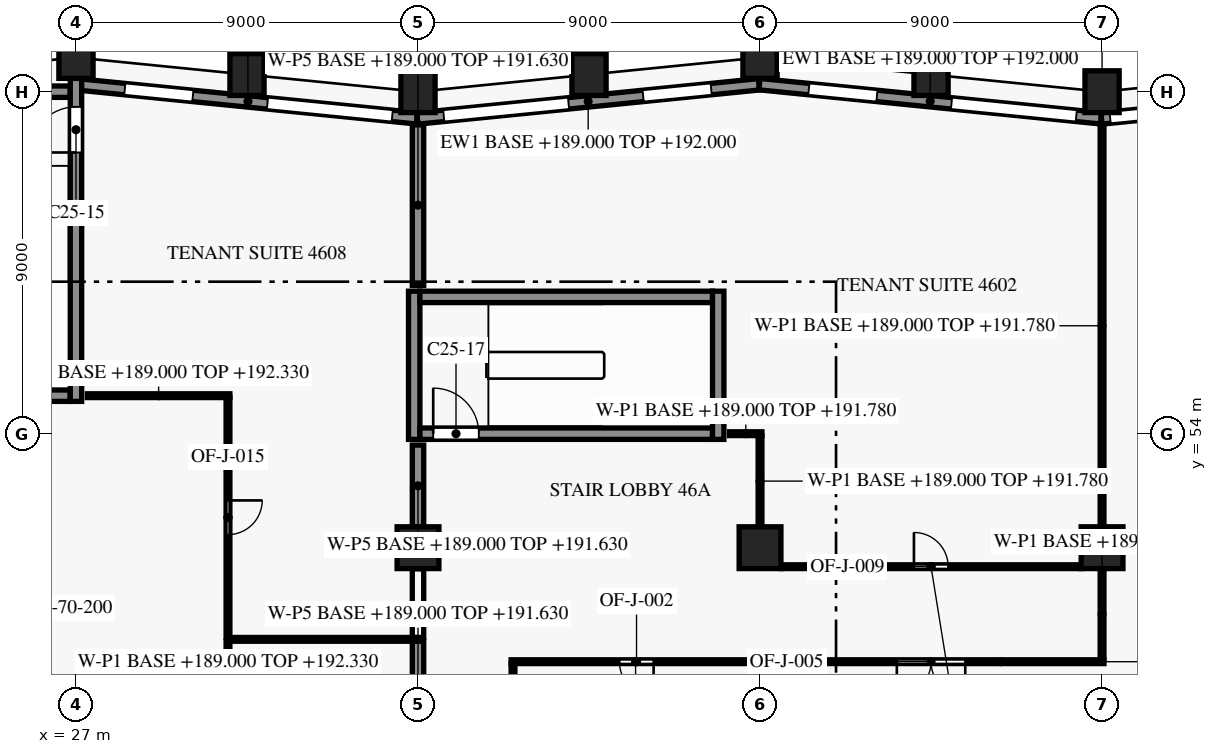
"""IFC4 building model, lengths in metres.
Left out: names, types, materials, properties, quantities, classifications, styles, units other than length and angle.
Written with IfcOpenShell. Run it as: python <this file> out.ifc"""

import sys

from ifc_helpers import new_model, si_unit, direction, frame, frame_2d, origin, origin_2d, place, context, subcontext, project, spatial, rectangle, extrude, element, fill, save


model = new_model("IFC4")
c1 = context("Model", 3, precision=1e-05, world=origin(), true_north=direction((0.0, 1.0)))
c2 = subcontext(c1, "Body", "Model", "MODEL_VIEW")
j1 = project(units=[si_unit("LENGTHUNIT", "METRE"), si_unit("PLANEANGLEUNIT", "RADIAN")], contexts=[c1])
p1 = place(None, origin())
s1 = spatial("IfcSite", under=j1, at=p1, CompositionType="ELEMENT")
p2 = place(p1, origin())
s2 = spatial("IfcBuilding", under=s1, at=p2, CompositionType="ELEMENT")
p3 = place(p2, frame((0.0, 0.0, 189.0)))
s3 = spatial("IfcBuildingStorey", under=s2, at=p3, CompositionType="ELEMENT", Elevation=189.0)
for number, where, z_axis, x_axis in (
    (1, (54.0, 63.0, 0.0), (0.0, 0.0, 1.0), (-1.0, 0.0, 0.0)),
    (2, (49.5, 63.45, 0.0), (0.0, 0.0, 1.0), (-0.995, 0.1, 0.0)),
    (3, (45.0, 63.9, 0.0), (0.0, 0.0, 1.0), (-1.0, 0.0, 0.0)),
    (4, (40.5, 63.45, 0.0), (0.0, 0.0, 1.0), (-0.995, -0.1, 0.0)),
    (5, (36.0, 63.0, 0.0), (0.0, 0.0, 1.0), (-1.0, 0.0, 0.0)),
    (6, (31.5, 63.45, 0.0), (0.0, 0.0, 1.0), (-0.995, 0.1, 0.0)),
    (7, (27.0, 63.9, 0.0), (0.0, 0.0, 1.0), (-1.0, 0.0, 0.0)),
):
    element("IfcColumn", number, at=place(p3, frame(where, z_axis=z_axis, x_axis=x_axis)), inside=s3, PredefinedType="COLUMN", context=c2, shape_type="SweptSolid", body=[
        extrude(rectangle(XDim=0.9, YDim=1.1, at=origin_2d()), origin(), (0.0, 0.0, 1.0), 3.8),
    ])
for number, where, z_axis, x_axis in (
    (8, (36.0, 51.0, 0.0), (0.0, 0.0, 1.0), (1.0, 0.0, 0.0)),
    (9, (45.0, 51.0, 0.0), (0.0, 0.0, 1.0), (1.0, 0.0, 0.0)),
    (10, (54.0, 51.0, 0.0), (0.0, 0.0, 1.0), (1.0, 0.0, 0.0)),
):
    element("IfcColumn", number, at=place(p3, frame(where, z_axis=z_axis, x_axis=x_axis)), inside=s3, PredefinedType="COLUMN", context=c2, shape_type="SweptSolid", body=[
        extrude(rectangle(XDim=1.1, YDim=1.1, at=origin_2d()), origin(), (0.0, 0.0, 1.0), 3.8),
    ])
p4 = place(p3, frame((53.985, 62.295, 0.0), z_axis=(0.0, 0.0, 1.0), x_axis=(0.99503719021, 0.099503719021, 0.0)))
e11 = element("IfcWall", 11, at=p4, inside=s3, PredefinedType="SOLIDWALL", context=c2, shape_type="SweptSolid", body=[
    extrude(rectangle(XDim=3.678, YDim=0.3, at=frame_2d((1.839, 0.0))), origin(), (0.0, 0.0, 1.0), 3.0),
])
p5 = place(p4, frame((0.228, 0.0, 0.15)))
e12 = element("IfcOpeningElement", 12, at=p5, cuts=e11, PredefinedType="OPENING", context=c2, shape_type="SweptSolid", body=[
    extrude(rectangle(XDim=3.3, YDim=2.4, at=frame_2d((1.65, 1.2))), frame((0.0, 0.16, 0.0), z_axis=(0.0, -1.0, 0.0), x_axis=(1.0, 0.0, 0.0)), (0.0, 0.0, 1.0), 0.32),
])
p6 = place(p3, frame((44.985, 63.198, 0.0), z_axis=(0.0, 0.0, 1.0), x_axis=(0.995037993253, -0.099495688264, 0.0)))
e13 = element("IfcWall", 13, at=p6, inside=s3, PredefinedType="SOLIDWALL", context=c2, shape_type="SweptSolid", body=[
    extrude(rectangle(XDim=9.03, YDim=0.3, at=frame_2d((4.515, 0.0))), origin(), (0.0, 0.0, 1.0), 3.0),
])
p7 = place(p6, frame((1.306, 0.0, 0.75)))
e14 = element("IfcOpeningElement", 14, at=p7, cuts=e13, PredefinedType="OPENING", context=c2, shape_type="SweptSolid", body=[
    extrude(rectangle(XDim=1.8, YDim=1.8, at=frame_2d((0.9, 0.9))), frame((0.0, 0.16, 0.0), z_axis=(0.0, -1.0, 0.0), x_axis=(1.0, 0.0, 0.0)), (0.0, 0.0, 1.0), 0.32),
])
p8 = place(p6, frame((5.079, 0.0, 0.15)))
e15 = element("IfcOpeningElement", 15, at=p8, cuts=e13, PredefinedType="OPENING", context=c2, shape_type="SweptSolid", body=[
    extrude(rectangle(XDim=3.3, YDim=2.4, at=frame_2d((1.65, 1.2))), frame((0.0, 0.16, 0.0), z_axis=(0.0, -1.0, 0.0), x_axis=(1.0, 0.0, 0.0)), (0.0, 0.0, 1.0), 0.32),
])
p9 = place(p3, frame((35.985, 62.295, 0.0), z_axis=(0.0, 0.0, 1.0), x_axis=(0.995035316196, 0.099522457379, 0.0)))
e16 = element("IfcWall", 16, at=p9, inside=s3, PredefinedType="SOLIDWALL", context=c2, shape_type="SweptSolid", body=[
    extrude(rectangle(XDim=9.03, YDim=0.3, at=frame_2d((4.515, 0.0))), origin(), (0.0, 0.0, 1.0), 3.0),
])
p10 = place(p9, frame((0.696, 0.0, 0.15)))
e17 = element("IfcOpeningElement", 17, at=p10, cuts=e16, PredefinedType="OPENING", context=c2, shape_type="SweptSolid", body=[
    extrude(rectangle(XDim=3.3, YDim=2.4, at=frame_2d((1.65, 1.2))), frame((0.0, 0.16, 0.0), z_axis=(0.0, -1.0, 0.0), x_axis=(1.0, 0.0, 0.0)), (0.0, 0.0, 1.0), 0.32),
])
p11 = place(p9, frame((5.969, 0.0, 0.75)))
e18 = element("IfcOpeningElement", 18, at=p11, cuts=e16, PredefinedType="OPENING", context=c2, shape_type="SweptSolid", body=[
    extrude(rectangle(XDim=1.8, YDim=1.8, at=frame_2d((0.9, 0.9))), frame((0.0, 0.16, 0.0), z_axis=(0.0, -1.0, 0.0), x_axis=(1.0, 0.0, 0.0)), (0.0, 0.0, 1.0), 0.32),
])
p12 = place(p3, frame((27.08, 63.189, 0.0), z_axis=(0.0, 0.0, 1.0), x_axis=(0.995036108007, -0.099514540459, 0.0)))
e19 = element("IfcWall", 19, at=p12, inside=s3, PredefinedType="SOLIDWALL", context=c2, shape_type="SweptSolid", body=[
    extrude(rectangle(XDim=8.935, YDim=0.3, at=frame_2d((4.468, 0.0))), origin(), (0.0, 0.0, 1.0), 3.0),
])
p13 = place(p12, frame((1.211, 0.0, 0.75)))
e20 = element("IfcOpeningElement", 20, at=p13, cuts=e19, PredefinedType="OPENING", context=c2, shape_type="SweptSolid", body=[
    extrude(rectangle(XDim=1.8, YDim=1.8, at=frame_2d((0.9, 0.9))), frame((0.0, 0.16, 0.0), z_axis=(0.0, -1.0, 0.0), x_axis=(1.0, 0.0, 0.0)), (0.0, 0.0, 1.0), 0.32),
])
p14 = place(p12, frame((4.984, 0.0, 0.15)))
e21 = element("IfcOpeningElement", 21, at=p14, cuts=e19, PredefinedType="OPENING", context=c2, shape_type="SweptSolid", body=[
    extrude(rectangle(XDim=3.3, YDim=2.4, at=frame_2d((1.65, 1.2))), frame((0.0, 0.16, 0.0), z_axis=(0.0, -1.0, 0.0), x_axis=(1.0, 0.0, 0.0)), (0.0, 0.0, 1.0), 0.32),
])
p15 = place(p3, frame((36.05, 54.0, 0.0), z_axis=(0.0, 0.0, 1.0), x_axis=(1.0, 0.0, 0.0)))
e22 = element("IfcWall", 22, at=p15, inside=s3, PredefinedType="SHEAR", context=c2, shape_type="SweptSolid", body=[
    extrude(rectangle(XDim=7.7, YDim=0.3, at=frame_2d((3.85, 0.0))), origin(), (0.0, 0.0, 1.0), 3.5),
])
p16 = place(p15, frame((0.35, 0.0, 0.0)))
e23 = element("IfcOpeningElement", 23, at=p16, cuts=e22, PredefinedType="OPENING", context=c2, shape_type="SweptSolid", body=[
    extrude(rectangle(XDim=1.2, YDim=2.2, at=frame_2d((0.6, 1.1))), frame((0.0, 0.16, 0.0), z_axis=(0.0, -1.0, 0.0), x_axis=(1.0, 0.0, 0.0)), (0.0, 0.0, 1.0), 0.32),
])
p17 = place(p3, frame((23.4, 55.0, 0.0), z_axis=(0.0, 0.0, 1.0), x_axis=(1.0, 0.0, 0.0)))
e24 = element("IfcWall", 24, at=p17, inside=s3, PredefinedType="SHEAR", context=c2, shape_type="SweptSolid", body=[
    extrude(rectangle(XDim=3.45, YDim=0.3, at=frame_2d((1.725, 0.0))), origin(), (0.0, 0.0, 1.0), 3.5),
])
p18 = place(p3, frame((36.05, 57.6, 0.0), z_axis=(0.0, 0.0, 1.0), x_axis=(1.0, 0.0, 0.0)))
e25 = element("IfcWall", 25, at=p18, inside=s3, PredefinedType="SHEAR", context=c2, shape_type="SweptSolid", body=[
    extrude(rectangle(XDim=7.7, YDim=0.3, at=frame_2d((3.85, 0.0))), origin(), (0.0, 0.0, 1.0), 3.5),
])
p19 = place(p3, frame((23.55, 63.0, 0.0), z_axis=(0.0, 0.0, 1.0), x_axis=(1.0, 0.0, 0.0)))
e26 = element("IfcWall", 26, at=p19, inside=s3, PredefinedType="SHEAR", context=c2, shape_type="SweptSolid", body=[
    extrude(rectangle(XDim=3.3, YDim=0.3, at=frame_2d((1.65, 0.0))), origin(), (0.0, 0.0, 1.0), 3.5),
])
p20 = place(p3, frame((27.0, 54.85, 0.0), z_axis=(0.0, 0.0, 1.0), x_axis=(0.0, 1.0, 0.0)))
e27 = element("IfcWall", 27, at=p20, inside=s3, PredefinedType="SHEAR", context=c2, shape_type="SweptSolid", body=[
    extrude(rectangle(XDim=8.5, YDim=0.3, at=frame_2d((4.25, 0.0))), origin(), (0.0, 0.0, 1.0), 3.5),
])
p21 = place(p20, frame((6.55, 0.0, 0.0)))
e28 = element("IfcOpeningElement", 28, at=p21, cuts=e27, PredefinedType="OPENING", context=c2, shape_type="SweptSolid", body=[
    extrude(rectangle(XDim=1.2, YDim=2.2, at=frame_2d((0.6, 1.1))), frame((0.0, 0.16, 0.0), z_axis=(0.0, -1.0, 0.0), x_axis=(1.0, 0.0, 0.0)), (0.0, 0.0, 1.0), 0.32),
])
for number, where, z_axis, x_axis in (
    (29, (35.9, 53.85, 0.0), (0.0, 0.0, 1.0), (0.0, 1.0, 0.0)),
    (30, (43.9, 53.85, 0.0), (0.0, 0.0, 1.0), (0.0, 1.0, 0.0)),
):
    element("IfcWall", number, at=place(p3, frame(where, z_axis=z_axis, x_axis=x_axis)), inside=s3, PredefinedType="SHEAR", context=c2, shape_type="SweptSolid", body=[
        extrude(rectangle(XDim=3.9, YDim=0.3, at=frame_2d((1.95, 0.0))), origin(), (0.0, 0.0, 1.0), 3.5),
    ])
p22 = place(p3, frame((36.0, 39.57, 0.0), z_axis=(0.0, 0.0, 1.0), x_axis=(0.0, 1.0, 0.0)))
e31 = element("IfcWall", 31, at=p22, inside=s3, PredefinedType="PARTITIONING", context=c2, shape_type="SweptSolid", body=[
    extrude(rectangle(XDim=8.968, YDim=0.3, at=frame_2d((4.484, 0.0))), origin(), (0.0, 0.0, 1.0), 2.63),
])
p23 = place(p3, frame((38.5, 47.95, 0.0), z_axis=(0.0, 0.0, 1.0), x_axis=(0.0, -1.0, 0.0)))
e32 = element("IfcWall", 32, at=p23, inside=s3, PredefinedType="PARTITIONING", context=c2, shape_type="SweptSolid", body=[
    extrude(rectangle(XDim=5.0, YDim=0.1, at=frame_2d((2.5, 0.0))), origin(), (0.0, 0.0, 1.0), 2.63),
])
p24 = place(p3, frame((45.0, 47.95, 0.0), z_axis=(0.0, 0.0, 1.0), x_axis=(0.0, -1.0, 0.0)))
e33 = element("IfcWall", 33, at=p24, inside=s3, PredefinedType="PARTITIONING", context=c2, shape_type="SweptSolid", body=[
    extrude(rectangle(XDim=0.85, YDim=0.1, at=frame_2d((0.425, 0.0))), origin(), (0.0, 0.0, 1.0), 2.63),
])
p25 = place(p3, frame((45.0, 48.0, 0.0), z_axis=(0.0, 0.0, 1.0), x_axis=(-1.0, 0.0, 0.0)))
e34 = element("IfcWall", 34, at=p25, inside=s3, PredefinedType="PARTITIONING", context=c2, shape_type="SweptSolid", body=[
    extrude(rectangle(XDim=6.55, YDim=0.1, at=frame_2d((3.275, 0.0))), origin(), (0.0, 0.0, 1.0), 2.78),
])
p26 = place(p25, frame((2.8, 0.0, 0.0)))
e35 = element("IfcOpeningElement", 35, at=p26, cuts=e34, PredefinedType="OPENING", context=c2, shape_type="SweptSolid", body=[
    extrude(rectangle(XDim=0.9, YDim=2.1, at=frame_2d((0.45, 1.05))), frame((0.0, 0.06, 0.0), z_axis=(0.0, -1.0, 0.0), x_axis=(1.0, 0.0, 0.0)), (0.0, 0.0, 1.0), 0.12),
])
p27 = place(p3, frame((54.05, 48.0, 0.0), z_axis=(0.0, 0.0, 1.0), x_axis=(-1.0, 0.0, 0.0)))
e36 = element("IfcWall", 36, at=p27, inside=s3, PredefinedType="PARTITIONING", context=c2, shape_type="SweptSolid", body=[
    extrude(rectangle(XDim=9.05, YDim=0.1, at=frame_2d((4.525, 0.0))), origin(), (0.0, 0.0, 1.0), 2.78),
])
p28 = place(p27, frame((3.65, 0.0, 0.0)))
e37 = element("IfcOpeningElement", 37, at=p28, cuts=e36, PredefinedType="OPENING", context=c2, shape_type="SweptSolid", body=[
    extrude(rectangle(XDim=1.8, YDim=2.1, at=frame_2d((0.9, 1.05))), frame((0.0, 0.06, 0.0), z_axis=(0.0, -1.0, 0.0), x_axis=(1.0, 0.0, 0.0)), (0.0, 0.0, 1.0), 0.12),
])
p29 = place(p3, frame((31.0, 48.538, 0.0), z_axis=(0.0, 0.0, 1.0), x_axis=(0.0, -1.0, 0.0)))
e38 = element("IfcWall", 38, at=p29, inside=s3, PredefinedType="PARTITIONING", context=c2, shape_type="SweptSolid", body=[
    extrude(rectangle(XDim=14.988, YDim=0.1, at=frame_2d((7.494, 0.0))), origin(), (0.0, 0.0, 1.0), 3.33),
])
p30 = place(p29, frame((5.794, 0.0, 0.0)))
e39 = element("IfcOpeningElement", 39, at=p30, cuts=e38, PredefinedType="OPENING", context=c2, shape_type="SweptSolid", body=[
    extrude(rectangle(XDim=0.9, YDim=2.1, at=frame_2d((0.45, 1.05))), frame((0.0, 0.06, 0.0), z_axis=(0.0, -1.0, 0.0), x_axis=(1.0, 0.0, 0.0)), (0.0, 0.0, 1.0), 0.12),
])
p31 = place(p3, frame((31.05, 48.588, 0.0), z_axis=(0.0, 0.0, 1.0), x_axis=(1.0, 0.0, 0.0)))
e40 = element("IfcWall", 40, at=p31, inside=s3, PredefinedType="PARTITIONING", context=c2, shape_type="SweptSolid", body=[
    extrude(rectangle(XDim=4.9, YDim=0.1, at=frame_2d((2.45, 0.0))), origin(), (0.0, 0.0, 1.0), 2.63),
])
p32 = place(p3, frame((36.0, 48.638, 0.0), z_axis=(0.0, 0.0, 1.0), x_axis=(0.0, 1.0, 0.0)))
e41 = element("IfcWall", 41, at=p32, inside=s3, PredefinedType="PARTITIONING", context=c2, shape_type="SweptSolid", body=[
    extrude(rectangle(XDim=1.807, YDim=0.3, at=frame_2d((0.904, 0.0))), origin(), (0.0, 0.0, 1.0), 2.63),
])
p33 = place(p3, frame((54.0, 50.445, 0.0), z_axis=(0.0, 0.0, 1.0), x_axis=(0.0, -1.0, 0.0)))
e42 = element("IfcWall", 42, at=p33, inside=s3, PredefinedType="PARTITIONING", context=c2, shape_type="SweptSolid", body=[
    extrude(rectangle(XDim=2.395, YDim=0.1, at=frame_2d((1.198, 0.0))), origin(), (0.0, 0.0, 1.0), 2.78),
])
p34 = place(p3, frame((45.555, 50.5, 0.0), z_axis=(0.0, 0.0, 1.0), x_axis=(1.0, 0.0, 0.0)))
e43 = element("IfcWall", 43, at=p34, inside=s3, PredefinedType="PARTITIONING", context=c2, shape_type="SweptSolid", body=[
    extrude(rectangle(XDim=7.89, YDim=0.1, at=frame_2d((3.945, 0.0))), origin(), (0.0, 0.0, 1.0), 3.33),
])
p35 = place(p34, frame((3.495, 0.0, 0.0)))
e44 = element("IfcOpeningElement", 44, at=p35, cuts=e43, PredefinedType="OPENING", context=c2, shape_type="SweptSolid", body=[
    extrude(rectangle(XDim=0.9, YDim=2.1, at=frame_2d((0.45, 1.05))), frame((0.0, 0.06, 0.0), z_axis=(0.0, -1.0, 0.0), x_axis=(1.0, 0.0, 0.0)), (0.0, 0.0, 1.0), 0.12),
])
p36 = place(p3, frame((36.0, 51.555, 0.0), z_axis=(0.0, 0.0, 1.0), x_axis=(0.0, 1.0, 0.0)))
e45 = element("IfcWall", 45, at=p36, inside=s3, PredefinedType="PARTITIONING", context=c2, shape_type="SweptSolid", body=[
    extrude(rectangle(XDim=2.145, YDim=0.3, at=frame_2d((1.073, 0.0))), origin(), (0.0, 0.0, 1.0), 2.63),
])
p37 = place(p3, frame((54.0, 51.555, 0.0), z_axis=(0.0, 0.0, 1.0), x_axis=(0.0, 1.0, 0.0)))
e46 = element("IfcWall", 46, at=p37, inside=s3, PredefinedType="PARTITIONING", context=c2, shape_type="SweptSolid", body=[
    extrude(rectangle(XDim=10.571, YDim=0.1, at=frame_2d((5.285, 0.0))), origin(), (0.0, 0.0, 1.0), 2.78),
])
p38 = place(p3, frame((45.0, 53.95, 0.0), z_axis=(0.0, 0.0, 1.0), x_axis=(0.0, -1.0, 0.0)))
e47 = element("IfcWall", 47, at=p38, inside=s3, PredefinedType="PARTITIONING", context=c2, shape_type="SweptSolid", body=[
    extrude(rectangle(XDim=2.395, YDim=0.1, at=frame_2d((1.198, 0.0))), origin(), (0.0, 0.0, 1.0), 2.78),
])
p39 = place(p3, frame((44.2, 54.0, 0.0), z_axis=(0.0, 0.0, 1.0), x_axis=(1.0, 0.0, 0.0)))
e48 = element("IfcWall", 48, at=p39, inside=s3, PredefinedType="PARTITIONING", context=c2, shape_type="SweptSolid", body=[
    extrude(rectangle(XDim=0.85, YDim=0.1, at=frame_2d((0.425, 0.0))), origin(), (0.0, 0.0, 1.0), 2.78),
])
p40 = place(p3, frame((31.0, 54.95, 0.0), z_axis=(0.0, 0.0, 1.0), x_axis=(0.0, -1.0, 0.0)))
e49 = element("IfcWall", 49, at=p40, inside=s3, PredefinedType="PARTITIONING", context=c2, shape_type="SweptSolid", body=[
    extrude(rectangle(XDim=6.312, YDim=0.1, at=frame_2d((3.156, 0.0))), origin(), (0.0, 0.0, 1.0), 3.33),
])
p41 = place(p40, frame((2.706, 0.0, 0.0)))
e50 = element("IfcOpeningElement", 50, at=p41, cuts=e49, PredefinedType="OPENING", context=c2, shape_type="SweptSolid", body=[
    extrude(rectangle(XDim=0.9, YDim=2.1, at=frame_2d((0.45, 1.05))), frame((0.0, 0.06, 0.0), z_axis=(0.0, -1.0, 0.0), x_axis=(1.0, 0.0, 0.0)), (0.0, 0.0, 1.0), 0.12),
])
p42 = place(p3, frame((27.3, 55.0, 0.0), z_axis=(0.0, 0.0, 1.0), x_axis=(1.0, 0.0, 0.0)))
e51 = element("IfcWall", 51, at=p42, inside=s3, PredefinedType="PARTITIONING", context=c2, shape_type="SweptSolid", body=[
    extrude(rectangle(XDim=3.75, YDim=0.1, at=frame_2d((1.875, 0.0))), origin(), (0.0, 0.0, 1.0), 3.33),
])
p43 = place(p3, frame((36.0, 57.9, 0.0), z_axis=(0.0, 0.0, 1.0), x_axis=(0.0, 1.0, 0.0)))
e52 = element("IfcWall", 52, at=p43, inside=s3, PredefinedType="PARTITIONING", context=c2, shape_type="SweptSolid", body=[
    extrude(rectangle(XDim=4.226, YDim=0.3, at=frame_2d((2.113, 0.0))), origin(), (0.0, 0.0, 1.0), 2.63),
])
p44 = place(p5, origin())
e53 = element("IfcWindow", 53, at=p44, inside=s3, PartitioningType="SINGLE_PANEL", PredefinedType="WINDOW", context=c2, shape_type="SweptSolid", body=[
    extrude(rectangle(XDim=3.3, YDim=2.4, at=frame_2d((1.65, 1.2))), frame((0.0, 0.03, 0.0), z_axis=(0.0, -1.0, 0.0), x_axis=(1.0, 0.0, 0.0)), (0.0, 0.0, 1.0), 0.06),
])
fill(e12, e53)
p45 = place(p7, origin())
e54 = element("IfcWindow", 54, at=p45, inside=s3, PartitioningType="SINGLE_PANEL", PredefinedType="WINDOW", context=c2, shape_type="SweptSolid", body=[
    extrude(rectangle(XDim=1.8, YDim=1.8, at=frame_2d((0.9, 0.9))), frame((0.0, 0.03, 0.0), z_axis=(0.0, -1.0, 0.0), x_axis=(1.0, 0.0, 0.0)), (0.0, 0.0, 1.0), 0.06),
])
fill(e14, e54)
p46 = place(p8, origin())
e55 = element("IfcWindow", 55, at=p46, inside=s3, PartitioningType="SINGLE_PANEL", PredefinedType="WINDOW", context=c2, shape_type="SweptSolid", body=[
    extrude(rectangle(XDim=3.3, YDim=2.4, at=frame_2d((1.65, 1.2))), frame((0.0, 0.03, 0.0), z_axis=(0.0, -1.0, 0.0), x_axis=(1.0, 0.0, 0.0)), (0.0, 0.0, 1.0), 0.06),
])
fill(e15, e55)
p47 = place(p10, origin())
e56 = element("IfcWindow", 56, at=p47, inside=s3, PartitioningType="SINGLE_PANEL", PredefinedType="WINDOW", context=c2, shape_type="SweptSolid", body=[
    extrude(rectangle(XDim=3.3, YDim=2.4, at=frame_2d((1.65, 1.2))), frame((0.0, 0.03, 0.0), z_axis=(0.0, -1.0, 0.0), x_axis=(1.0, 0.0, 0.0)), (0.0, 0.0, 1.0), 0.06),
])
fill(e17, e56)
p48 = place(p11, origin())
e57 = element("IfcWindow", 57, at=p48, inside=s3, PartitioningType="SINGLE_PANEL", PredefinedType="WINDOW", context=c2, shape_type="SweptSolid", body=[
    extrude(rectangle(XDim=1.8, YDim=1.8, at=frame_2d((0.9, 0.9))), frame((0.0, 0.03, 0.0), z_axis=(0.0, -1.0, 0.0), x_axis=(1.0, 0.0, 0.0)), (0.0, 0.0, 1.0), 0.06),
])
fill(e18, e57)
p49 = place(p13, origin())
e58 = element("IfcWindow", 58, at=p49, inside=s3, PartitioningType="SINGLE_PANEL", PredefinedType="WINDOW", context=c2, shape_type="SweptSolid", body=[
    extrude(rectangle(XDim=1.8, YDim=1.8, at=frame_2d((0.9, 0.9))), frame((0.0, 0.03, 0.0), z_axis=(0.0, -1.0, 0.0), x_axis=(1.0, 0.0, 0.0)), (0.0, 0.0, 1.0), 0.06),
])
fill(e20, e58)
p50 = place(p14, origin())
e59 = element("IfcWindow", 59, at=p50, inside=s3, PartitioningType="SINGLE_PANEL", PredefinedType="WINDOW", context=c2, shape_type="SweptSolid", body=[
    extrude(rectangle(XDim=3.3, YDim=2.4, at=frame_2d((1.65, 1.2))), frame((0.0, 0.03, 0.0), z_axis=(0.0, -1.0, 0.0), x_axis=(1.0, 0.0, 0.0)), (0.0, 0.0, 1.0), 0.06),
])
fill(e21, e59)
p51 = place(p21, origin())
e60 = element("IfcDoor", 60, at=p51, inside=s3, OperationType="SINGLE_SWING_LEFT", PredefinedType="DOOR", context=c2, shape_type="SweptSolid", body=[
    extrude(rectangle(XDim=1.2, YDim=2.2, at=frame_2d((0.6, 1.1))), frame((0.0, 0.025, 0.0), z_axis=(0.0, -1.0, 0.0), x_axis=(1.0, 0.0, 0.0)), (0.0, 0.0, 1.0), 0.05),
])
fill(e28, e60)
p52 = place(p16, origin())
e61 = element("IfcDoor", 61, at=p52, inside=s3, OperationType="SINGLE_SWING_LEFT", PredefinedType="DOOR", context=c2, shape_type="SweptSolid", body=[
    extrude(rectangle(XDim=1.2, YDim=2.2, at=frame_2d((0.6, 1.1))), frame((0.0, 0.025, 0.0), z_axis=(0.0, -1.0, 0.0), x_axis=(1.0, 0.0, 0.0)), (0.0, 0.0, 1.0), 0.05),
])
fill(e23, e61)
p53 = place(p26, origin())
e62 = element("IfcDoor", 62, at=p53, inside=s3, OperationType="SINGLE_SWING_RIGHT", PredefinedType="DOOR", context=c2, shape_type="SweptSolid", body=[
    extrude(rectangle(XDim=0.9, YDim=2.1, at=frame_2d((0.45, 1.05))), frame((0.0, 0.025, 0.0), z_axis=(0.0, -1.0, 0.0), x_axis=(1.0, 0.0, 0.0)), (0.0, 0.0, 1.0), 0.05),
])
fill(e35, e62)
p54 = place(p28, origin())
e63 = element("IfcDoor", 63, at=p54, inside=s3, OperationType="DOUBLE_DOOR_SINGLE_SWING", PredefinedType="DOOR", context=c2, shape_type="SweptSolid", body=[
    extrude(rectangle(XDim=1.8, YDim=2.1, at=frame_2d((0.9, 1.05))), frame((0.0, 0.025, 0.0), z_axis=(0.0, -1.0, 0.0), x_axis=(1.0, 0.0, 0.0)), (0.0, 0.0, 1.0), 0.05),
])
fill(e37, e63)
p55 = place(p35, origin())
e64 = element("IfcDoor", 64, at=p55, inside=s3, OperationType="SINGLE_SWING_LEFT", PredefinedType="DOOR", context=c2, shape_type="SweptSolid", body=[
    extrude(rectangle(XDim=0.9, YDim=2.1, at=frame_2d((0.45, 1.05))), frame((0.0, 0.025, 0.0), z_axis=(0.0, -1.0, 0.0), x_axis=(1.0, 0.0, 0.0)), (0.0, 0.0, 1.0), 0.05),
])
fill(e44, e64)
p56 = place(p41, origin())
e65 = element("IfcDoor", 65, at=p56, inside=s3, OperationType="SINGLE_SWING_LEFT", PredefinedType="DOOR", context=c2, shape_type="SweptSolid", body=[
    extrude(rectangle(XDim=0.9, YDim=2.1, at=frame_2d((0.45, 1.05))), frame((0.0, 0.025, 0.0), z_axis=(0.0, -1.0, 0.0), x_axis=(1.0, 0.0, 0.0)), (0.0, 0.0, 1.0), 0.05),
])
fill(e50, e65)
save(model, sys.argv[1])
